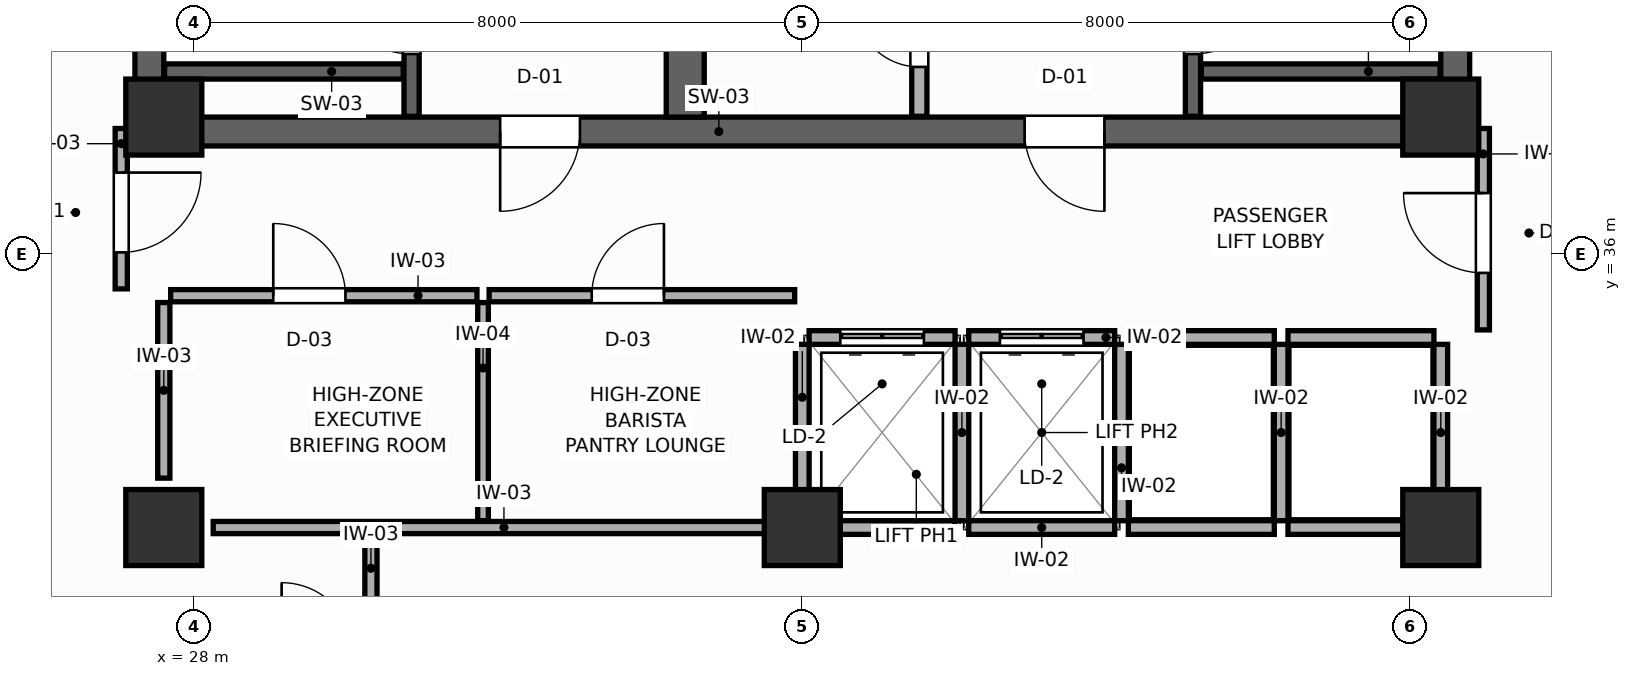
"""IFC4 building model, lengths in metres.
Left out: names, types, materials, properties, quantities, classifications, styles, units other than length and angle.
Written with IfcOpenShell. Run it as: python <this file> out.ifc"""

import sys

from ifc_helpers import new_model, si_unit, direction, frame, frame_2d, origin, origin_2d, place, context, subcontext, project, spatial, rectangle, extrude, source, transform, mapped, element, fill, save


model = new_model("IFC4")
c1 = context("Model", 3, precision=1e-05, world=origin(), true_north=direction((0.0, 1.0)))
c2 = subcontext(c1, "Body", "Model", "MODEL_VIEW")
j1 = project(units=[si_unit("LENGTHUNIT", "METRE"), si_unit("PLANEANGLEUNIT", "RADIAN")], contexts=[c1])
p1 = place(None, origin())
s1 = spatial("IfcSite", under=j1, at=p1, CompositionType="ELEMENT")
p2 = place(p1, origin())
s2 = spatial("IfcBuilding", under=s1, at=p2, CompositionType="ELEMENT")
p3 = place(p2, frame((0.0, 0.0, 238.2)))
s3 = spatial("IfcBuildingStorey", under=s2, at=p3, CompositionType="ELEMENT", Elevation=238.2)
p4 = place(p3, frame((27.22, 37.61, 0.0), z_axis=(0.0, 0.0, 1.0), x_axis=(1.0, 0.0, 0.0)))
e1 = element("IfcWall", 1, at=p4, inside=s3, PredefinedType="SHEAR", context=c2, shape_type="SweptSolid", body=[
    extrude(rectangle(XDim=17.56, YDim=0.38, at=frame_2d((8.78, 0.0))), origin(), (0.0, 0.0, 1.0), 4.8),
])
p5 = place(p4, frame((4.805, 0.0, 0.0)))
e2 = element("IfcOpeningElement", 2, at=p5, cuts=e1, PredefinedType="OPENING", context=c2, shape_type="SweptSolid", body=[
    extrude(rectangle(XDim=1.05, YDim=2.1, at=frame_2d((0.525, 1.05))), frame((0.0, 0.2, 0.0), z_axis=(0.0, -1.0, 0.0), x_axis=(1.0, 0.0, 0.0)), (0.0, 0.0, 1.0), 0.4),
])
p6 = place(p4, frame((11.705, 0.0, 0.0)))
e3 = element("IfcOpeningElement", 3, at=p6, cuts=e1, PredefinedType="OPENING", context=c2, shape_type="SweptSolid", body=[
    extrude(rectangle(XDim=1.05, YDim=2.1, at=frame_2d((0.525, 1.05))), frame((0.0, 0.2, 0.0), z_axis=(0.0, -1.0, 0.0), x_axis=(1.0, 0.0, 0.0)), (0.0, 0.0, 1.0), 0.4),
])
for number, where, z_axis, x_axis in (
    (4, (27.41, 37.8, 0.0), (0.0, 0.0, 1.0), (0.0, 1.0, 0.0)),
    (5, (44.59, 37.8, 0.0), (0.0, 0.0, 1.0), (0.0, 1.0, 0.0)),
):
    element("IfcWall", number, at=place(p3, frame(where, z_axis=z_axis, x_axis=x_axis)), inside=s3, PredefinedType="SHEAR", context=c2, shape_type="SweptSolid", body=[
        extrude(rectangle(XDim=9.0, YDim=0.38, at=frame_2d((4.5, 0.0))), origin(), (0.0, 0.0, 1.0), 4.8),
    ])
p7 = place(p3, frame((34.46, 37.8, 0.0), z_axis=(0.0, 0.0, 1.0), x_axis=(0.0, 1.0, 0.0)))
e6 = element("IfcWall", 6, at=p7, inside=s3, PredefinedType="SHEAR", context=c2, shape_type="SweptSolid", body=[
    extrude(rectangle(XDim=9.0, YDim=0.5, at=frame_2d((4.5, 0.0))), origin(), (0.0, 0.0, 1.0), 4.61),
])
m1 = source(origin(), c2, "Body", "SweptSolid", [
    extrude(rectangle(XDim=1.0, YDim=1.0, at=origin_2d()), origin(), (0.0, 0.0, 1.0), 4.8),
])
for number, where, z_axis, x_axis in (
    (7, (27.6, 37.8, 0.0), (0.0, 0.0, 1.0), (1.0, 0.0, 0.0)),
    (8, (44.4, 37.8, 0.0), (0.0, 0.0, 1.0), (1.0, 0.0, 0.0)),
    (9, (27.6, 32.4, 0.0), (0.0, 0.0, 1.0), (1.0, 0.0, 0.0)),
    (10, (44.4, 32.4, 0.0), (0.0, 0.0, 1.0), (1.0, 0.0, 0.0)),
    (11, (36.0, 32.4, 0.0), (0.0, 0.0, 1.0), (1.0, 0.0, 0.0)),
):
    element("IfcColumn", number, at=place(p3, frame(where, z_axis=z_axis, x_axis=x_axis)), inside=s3, PredefinedType="COLUMN", context=c2, shape_type="MappedRepresentation", body=[
        mapped(m1, transform((0.0, 0.0, 0.0), scale=1.0)),
    ])
p8 = place(p3, frame((30.86, 37.81, 0.0), z_axis=(0.0, 0.0, 1.0), x_axis=(0.0, 1.0, 0.0)))
e12 = element("IfcWall", 12, at=p8, inside=s3, PredefinedType="SHEAR", context=c2, shape_type="SweptSolid", body=[
    extrude(rectangle(XDim=8.98, YDim=0.2, at=frame_2d((4.49, 0.0))), origin(), (0.0, 0.0, 1.0), 4.8),
])
p9 = place(p8, frame((0.82, 0.0, 0.0)))
e13 = element("IfcOpeningElement", 13, at=p9, cuts=e12, PredefinedType="OPENING", context=c2, shape_type="SweptSolid", body=[
    extrude(rectangle(XDim=1.05, YDim=2.1, at=frame_2d((0.525, 1.05))), frame((0.0, 0.11, 0.0), z_axis=(0.0, -1.0, 0.0), x_axis=(1.0, 0.0, 0.0)), (0.0, 0.0, 1.0), 0.22),
])
p10 = place(p3, frame((27.61, 38.4, 0.0), z_axis=(0.0, 0.0, 1.0), x_axis=(1.0, 0.0, 0.0)))
e14 = element("IfcWall", 14, at=p10, inside=s3, PredefinedType="SHEAR", context=c2, shape_type="SweptSolid", body=[
    extrude(rectangle(XDim=3.14, YDim=0.2, at=frame_2d((1.57, 0.0))), origin(), (0.0, 0.0, 1.0), 4.8),
])
p11 = place(p3, frame((41.14, 37.81, 0.0), z_axis=(0.0, 0.0, 1.0), x_axis=(0.0, 1.0, 0.0)))
e15 = element("IfcWall", 15, at=p11, inside=s3, PredefinedType="SHEAR", context=c2, shape_type="SweptSolid", body=[
    extrude(rectangle(XDim=8.98, YDim=0.2, at=frame_2d((4.49, 0.0))), origin(), (0.0, 0.0, 1.0), 4.8),
])
p12 = place(p11, frame((0.82, 0.0, 0.0)))
e16 = element("IfcOpeningElement", 16, at=p12, cuts=e15, PredefinedType="OPENING", context=c2, shape_type="SweptSolid", body=[
    extrude(rectangle(XDim=1.05, YDim=2.1, at=frame_2d((0.525, 1.05))), frame((0.0, 0.11, 0.0), z_axis=(0.0, -1.0, 0.0), x_axis=(1.0, 0.0, 0.0)), (0.0, 0.0, 1.0), 0.22),
])
p13 = place(p3, frame((41.25, 38.4, 0.0), z_axis=(0.0, 0.0, 1.0), x_axis=(1.0, 0.0, 0.0)))
e17 = element("IfcWall", 17, at=p13, inside=s3, PredefinedType="SHEAR", context=c2, shape_type="SweptSolid", body=[
    extrude(rectangle(XDim=3.14, YDim=0.2, at=frame_2d((1.57, 0.0))), origin(), (0.0, 0.0, 1.0), 4.8),
])
p14 = place(p3, frame((37.54, 37.81, 0.0), z_axis=(0.0, 0.0, 1.0), x_axis=(0.0, 1.0, 0.0)))
e18 = element("IfcWall", 18, at=p14, inside=s3, PredefinedType="PARTITIONING", context=c2, shape_type="SweptSolid", body=[
    extrude(rectangle(XDim=8.98, YDim=0.2, at=frame_2d((4.49, 0.0))), origin(), (0.0, 0.0, 1.0), 4.61),
])
p15 = place(p14, frame((0.65, 0.0, 0.0)))
e19 = element("IfcOpeningElement", 19, at=p15, cuts=e18, PredefinedType="OPENING", context=c2, shape_type="SweptSolid", body=[
    extrude(rectangle(XDim=0.85, YDim=2.05, at=frame_2d((0.425, 1.025))), frame((0.0, 0.11, 0.0), z_axis=(0.0, -1.0, 0.0), x_axis=(1.0, 0.0, 0.0)), (0.0, 0.0, 1.0), 0.22),
])
p16 = place(p3, frame((36.09, 34.9, 0.0), z_axis=(0.0, 0.0, 1.0), x_axis=(1.0, 0.0, 0.0)))
e20 = element("IfcWall", 20, at=p16, inside=s3, PredefinedType="PARTITIONING", context=c2, shape_type="SweptSolid", body=[
    extrude(rectangle(XDim=1.92, YDim=0.18, at=frame_2d((0.96, 0.0))), origin(), (0.0, 0.0, 1.0), 4.61),
])
p17 = place(p16, frame((0.41, 0.0, 0.0)))
e21 = element("IfcOpeningElement", 21, at=p17, cuts=e20, PredefinedType="OPENING", context=c2, shape_type="SweptSolid", body=[
    extrude(rectangle(XDim=1.1, YDim=2.1, at=frame_2d((0.55, 1.05))), frame((0.0, 0.1, 0.0), z_axis=(0.0, -1.0, 0.0), x_axis=(1.0, 0.0, 0.0)), (0.0, 0.0, 1.0), 0.2),
])
p18 = place(p3, frame((36.09, 32.4, 0.0), z_axis=(0.0, 0.0, 1.0), x_axis=(1.0, 0.0, 0.0)))
e22 = element("IfcWall", 22, at=p18, inside=s3, PredefinedType="PARTITIONING", context=c2, shape_type="SweptSolid", body=[
    extrude(rectangle(XDim=1.92, YDim=0.18, at=frame_2d((0.96, 0.0))), origin(), (0.0, 0.0, 1.0), 2.57),
])
p19 = place(p3, frame((36.0, 32.49, 0.0), z_axis=(0.0, 0.0, 1.0), x_axis=(0.0, 1.0, 0.0)))
e23 = element("IfcWall", 23, at=p19, inside=s3, PredefinedType="PARTITIONING", context=c2, shape_type="SweptSolid", body=[
    extrude(rectangle(XDim=2.32, YDim=0.18, at=frame_2d((1.16, 0.0))), origin(), (0.0, 0.0, 1.0), 4.61),
])
p20 = place(p3, frame((38.19, 34.9, 0.0), z_axis=(0.0, 0.0, 1.0), x_axis=(1.0, 0.0, 0.0)))
e24 = element("IfcWall", 24, at=p20, inside=s3, PredefinedType="PARTITIONING", context=c2, shape_type="SweptSolid", body=[
    extrude(rectangle(XDim=1.92, YDim=0.18, at=frame_2d((0.96, 0.0))), origin(), (0.0, 0.0, 1.0), 4.61),
])
p21 = place(p20, frame((0.41, 0.0, 0.0)))
e25 = element("IfcOpeningElement", 25, at=p21, cuts=e24, PredefinedType="OPENING", context=c2, shape_type="SweptSolid", body=[
    extrude(rectangle(XDim=1.1, YDim=2.1, at=frame_2d((0.55, 1.05))), frame((0.0, 0.1, 0.0), z_axis=(0.0, -1.0, 0.0), x_axis=(1.0, 0.0, 0.0)), (0.0, 0.0, 1.0), 0.2),
])
p22 = place(p3, frame((38.19, 32.4, 0.0), z_axis=(0.0, 0.0, 1.0), x_axis=(1.0, 0.0, 0.0)))
e26 = element("IfcWall", 26, at=p22, inside=s3, PredefinedType="PARTITIONING", context=c2, shape_type="SweptSolid", body=[
    extrude(rectangle(XDim=1.92, YDim=0.18, at=frame_2d((0.96, 0.0))), origin(), (0.0, 0.0, 1.0), 2.57),
])
p23 = place(p3, frame((38.1, 32.49, 0.0), z_axis=(0.0, 0.0, 1.0), x_axis=(0.0, 1.0, 0.0)))
e27 = element("IfcWall", 27, at=p23, inside=s3, PredefinedType="PARTITIONING", context=c2, shape_type="SweptSolid", body=[
    extrude(rectangle(XDim=2.32, YDim=0.18, at=frame_2d((1.16, 0.0))), origin(), (0.0, 0.0, 1.0), 4.61),
])
p24 = place(p3, frame((40.29, 34.9, 0.0), z_axis=(0.0, 0.0, 1.0), x_axis=(1.0, 0.0, 0.0)))
e28 = element("IfcWall", 28, at=p24, inside=s3, PredefinedType="PARTITIONING", context=c2, shape_type="SweptSolid", body=[
    extrude(rectangle(XDim=1.92, YDim=0.18, at=frame_2d((0.96, 0.0))), origin(), (0.0, 0.0, 1.0), 4.61),
])
p25 = place(p3, frame((40.29, 32.4, 0.0), z_axis=(0.0, 0.0, 1.0), x_axis=(1.0, 0.0, 0.0)))
e29 = element("IfcWall", 29, at=p25, inside=s3, PredefinedType="PARTITIONING", context=c2, shape_type="SweptSolid", body=[
    extrude(rectangle(XDim=1.92, YDim=0.18, at=frame_2d((0.96, 0.0))), origin(), (0.0, 0.0, 1.0), 2.57),
])
p26 = place(p3, frame((40.2, 32.49, 0.0), z_axis=(0.0, 0.0, 1.0), x_axis=(0.0, 1.0, 0.0)))
e30 = element("IfcWall", 30, at=p26, inside=s3, PredefinedType="PARTITIONING", context=c2, shape_type="SweptSolid", body=[
    extrude(rectangle(XDim=2.32, YDim=0.18, at=frame_2d((1.16, 0.0))), origin(), (0.0, 0.0, 1.0), 4.61),
])
p27 = place(p3, frame((42.39, 34.9, 0.0), z_axis=(0.0, 0.0, 1.0), x_axis=(1.0, 0.0, 0.0)))
e31 = element("IfcWall", 31, at=p27, inside=s3, PredefinedType="PARTITIONING", context=c2, shape_type="SweptSolid", body=[
    extrude(rectangle(XDim=1.92, YDim=0.18, at=frame_2d((0.96, 0.0))), origin(), (0.0, 0.0, 1.0), 4.61),
])
p28 = place(p3, frame((42.39, 32.4, 0.0), z_axis=(0.0, 0.0, 1.0), x_axis=(1.0, 0.0, 0.0)))
e32 = element("IfcWall", 32, at=p28, inside=s3, PredefinedType="PARTITIONING", context=c2, shape_type="SweptSolid", body=[
    extrude(rectangle(XDim=1.92, YDim=0.18, at=frame_2d((0.96, 0.0))), origin(), (0.0, 0.0, 1.0), 2.57),
])
for number, where, z_axis, x_axis in (
    (33, (42.3, 32.49, 0.0), (0.0, 0.0, 1.0), (0.0, 1.0, 0.0)),
    (34, (44.4, 32.49, 0.0), (0.0, 0.0, 1.0), (0.0, 1.0, 0.0)),
):
    element("IfcWall", number, at=place(p3, frame(where, z_axis=z_axis, x_axis=x_axis)), inside=s3, PredefinedType="PARTITIONING", context=c2, shape_type="SweptSolid", body=[
        extrude(rectangle(XDim=2.32, YDim=0.18, at=frame_2d((1.16, 0.0))), origin(), (0.0, 0.0, 1.0), 4.61),
    ])
p29 = place(p3, frame((28.25, 32.4, 0.0), z_axis=(0.0, 0.0, 1.0), x_axis=(1.0, 0.0, 0.0)))
e35 = element("IfcWall", 35, at=p29, inside=s3, PredefinedType="PARTITIONING", context=c2, shape_type="SweptSolid", body=[
    extrude(rectangle(XDim=7.65, YDim=0.16, at=frame_2d((3.825, 0.0))), origin(), (0.0, 0.0, 1.0), 2.57),
])
p30 = place(p3, frame((27.6, 33.05, 0.0), z_axis=(0.0, 0.0, 1.0), x_axis=(0.0, 1.0, 0.0)))
e36 = element("IfcWall", 36, at=p30, inside=s3, PredefinedType="PARTITIONING", context=c2, shape_type="SweptSolid", body=[
    extrude(rectangle(XDim=2.31, YDim=0.16, at=frame_2d((1.155, 0.0))), origin(), (0.0, 0.0, 1.0), 4.61),
])
p31 = place(p3, frame((31.8, 32.49, 0.0), z_axis=(0.0, 0.0, 1.0), x_axis=(0.0, 1.0, 0.0)))
e37 = element("IfcWall", 37, at=p31, inside=s3, PredefinedType="PARTITIONING", context=c2, shape_type="SweptSolid", body=[
    extrude(rectangle(XDim=2.87, YDim=0.14, at=frame_2d((1.435, 0.0))), origin(), (0.0, 0.0, 1.0), 4.61),
])
p32 = place(p3, frame((27.69, 35.45, 0.0), z_axis=(0.0, 0.0, 1.0), x_axis=(1.0, 0.0, 0.0)))
e38 = element("IfcWall", 38, at=p32, inside=s3, PredefinedType="PARTITIONING", context=c2, shape_type="SweptSolid", body=[
    extrude(rectangle(XDim=4.03, YDim=0.16, at=frame_2d((2.015, 0.0))), origin(), (0.0, 0.0, 1.0), 4.61),
])
p33 = place(p32, frame((1.35, 0.0, 0.0)))
e39 = element("IfcOpeningElement", 39, at=p33, cuts=e38, PredefinedType="OPENING", context=c2, shape_type="SweptSolid", body=[
    extrude(rectangle(XDim=0.95, YDim=2.05, at=frame_2d((0.475, 1.025))), frame((0.0, 0.09, 0.0), z_axis=(0.0, -1.0, 0.0), x_axis=(1.0, 0.0, 0.0)), (0.0, 0.0, 1.0), 0.18),
])
p34 = place(p3, frame((31.88, 35.45, 0.0), z_axis=(0.0, 0.0, 1.0), x_axis=(1.0, 0.0, 0.0)))
e40 = element("IfcWall", 40, at=p34, inside=s3, PredefinedType="PARTITIONING", context=c2, shape_type="SweptSolid", body=[
    extrude(rectangle(XDim=4.02, YDim=0.16, at=frame_2d((2.01, 0.0))), origin(), (0.0, 0.0, 1.0), 4.61),
])
p35 = place(p34, frame((1.35, 0.0, 0.0)))
e41 = element("IfcOpeningElement", 41, at=p35, cuts=e40, PredefinedType="OPENING", context=c2, shape_type="SweptSolid", body=[
    extrude(rectangle(XDim=0.95, YDim=2.05, at=frame_2d((0.475, 1.025))), frame((0.0, 0.09, 0.0), z_axis=(0.0, -1.0, 0.0), x_axis=(1.0, 0.0, 0.0)), (0.0, 0.0, 1.0), 0.18),
])
p36 = place(p3, frame((27.04, 35.54, 0.0), z_axis=(0.0, 0.0, 1.0), x_axis=(0.0, 1.0, 0.0)))
e42 = element("IfcWall", 42, at=p36, inside=s3, PredefinedType="PARTITIONING", context=c2, shape_type="SweptSolid", body=[
    extrude(rectangle(XDim=2.11, YDim=0.16, at=frame_2d((1.055, 0.0))), origin(), (0.0, 0.0, 1.0), 4.61),
])
p37 = place(p36, frame((0.48, 0.0, 0.0)))
e43 = element("IfcOpeningElement", 43, at=p37, cuts=e42, PredefinedType="OPENING", context=c2, shape_type="SweptSolid", body=[
    extrude(rectangle(XDim=1.05, YDim=2.1, at=frame_2d((0.525, 1.05))), frame((0.0, 0.09, 0.0), z_axis=(0.0, -1.0, 0.0), x_axis=(1.0, 0.0, 0.0)), (0.0, 0.0, 1.0), 0.18),
])
p38 = place(p3, frame((44.96, 35.0, 0.0), z_axis=(0.0, 0.0, 1.0), x_axis=(0.0, 1.0, 0.0)))
e44 = element("IfcWall", 44, at=p38, inside=s3, PredefinedType="PARTITIONING", context=c2, shape_type="SweptSolid", body=[
    extrude(rectangle(XDim=2.65, YDim=0.16, at=frame_2d((1.325, 0.0))), origin(), (0.0, 0.0, 1.0), 4.61),
])
p39 = place(p38, frame((0.75, 0.0, 0.0)))
e45 = element("IfcOpeningElement", 45, at=p39, cuts=e44, PredefinedType="OPENING", context=c2, shape_type="SweptSolid", body=[
    extrude(rectangle(XDim=1.05, YDim=2.1, at=frame_2d((0.525, 1.05))), frame((0.0, 0.09, 0.0), z_axis=(0.0, -1.0, 0.0), x_axis=(1.0, 0.0, 0.0)), (0.0, 0.0, 1.0), 0.18),
])
p40 = place(p3, frame((30.325, 30.807, 0.0), z_axis=(0.0, 0.0, 1.0), x_axis=(0.0, 1.0, 0.0)))
e46 = element("IfcWall", 46, at=p40, inside=s3, PredefinedType="PARTITIONING", context=c2, shape_type="SweptSolid", body=[
    extrude(rectangle(XDim=1.511, YDim=0.16, at=frame_2d((0.756, 0.0))), origin(), (0.0, 0.0, 1.0), 4.61),
])
p41 = place(p9, origin())
e47 = element("IfcDoor", 47, at=p41, inside=s3, OperationType="SINGLE_SWING_RIGHT", PredefinedType="DOOR", context=c2, shape_type="SweptSolid", body=[
    extrude(rectangle(XDim=1.05, YDim=2.1, at=frame_2d((0.525, 1.05))), frame((0.0, 0.025, 0.0), z_axis=(0.0, -1.0, 0.0), x_axis=(1.0, 0.0, 0.0)), (0.0, 0.0, 1.0), 0.05),
])
fill(e13, e47)
p42 = place(p12, frame((1.05, 0.0, 0.0), z_axis=(0.0, 0.0, 1.0), x_axis=(-1.0, 0.0, 0.0)))
e48 = element("IfcDoor", 48, at=p42, inside=s3, OperationType="SINGLE_SWING_LEFT", PredefinedType="DOOR", context=c2, shape_type="SweptSolid", body=[
    extrude(rectangle(XDim=1.05, YDim=2.1, at=frame_2d((0.525, 1.05))), frame((0.0, 0.025, 0.0), z_axis=(0.0, -1.0, 0.0), x_axis=(1.0, 0.0, 0.0)), (0.0, 0.0, 1.0), 0.05),
])
fill(e16, e48)
p43 = place(p15, origin())
e49 = element("IfcDoor", 49, at=p43, inside=s3, OperationType="SINGLE_SWING_RIGHT", PredefinedType="DOOR", context=c2, shape_type="SweptSolid", body=[
    extrude(rectangle(XDim=0.85, YDim=2.05, at=frame_2d((0.425, 1.025))), frame((0.0, 0.025, 0.0), z_axis=(0.0, -1.0, 0.0), x_axis=(1.0, 0.0, 0.0)), (0.0, 0.0, 1.0), 0.05),
])
fill(e19, e49)
p44 = place(p17, origin())
e50 = element("IfcDoor", 50, at=p44, inside=s3, OperationType="DOUBLE_DOOR_SLIDING", PredefinedType="DOOR", context=c2, shape_type="SweptSolid", body=[
    extrude(rectangle(XDim=1.1, YDim=2.1, at=frame_2d((0.55, 1.05))), frame((0.0, 0.025, 0.0), z_axis=(0.0, -1.0, 0.0), x_axis=(1.0, 0.0, 0.0)), (0.0, 0.0, 1.0), 0.05),
])
fill(e21, e50)
p45 = place(p21, origin())
e51 = element("IfcDoor", 51, at=p45, inside=s3, OperationType="DOUBLE_DOOR_SLIDING", PredefinedType="DOOR", context=c2, shape_type="SweptSolid", body=[
    extrude(rectangle(XDim=1.1, YDim=2.1, at=frame_2d((0.55, 1.05))), frame((0.0, 0.025, 0.0), z_axis=(0.0, -1.0, 0.0), x_axis=(1.0, 0.0, 0.0)), (0.0, 0.0, 1.0), 0.05),
])
fill(e25, e51)
p46 = place(p33, origin())
e52 = element("IfcDoor", 52, at=p46, inside=s3, OperationType="SINGLE_SWING_LEFT", PredefinedType="DOOR", context=c2, shape_type="SweptSolid", body=[
    extrude(rectangle(XDim=0.95, YDim=2.05, at=frame_2d((0.475, 1.025))), frame((0.0, 0.025, 0.0), z_axis=(0.0, -1.0, 0.0), x_axis=(1.0, 0.0, 0.0)), (0.0, 0.0, 1.0), 0.05),
])
fill(e39, e52)
p47 = place(p35, origin())
e53 = element("IfcDoor", 53, at=p47, inside=s3, OperationType="SINGLE_SWING_RIGHT", PredefinedType="DOOR", context=c2, shape_type="SweptSolid", body=[
    extrude(rectangle(XDim=0.95, YDim=2.05, at=frame_2d((0.475, 1.025))), frame((0.0, 0.025, 0.0), z_axis=(0.0, -1.0, 0.0), x_axis=(1.0, 0.0, 0.0)), (0.0, 0.0, 1.0), 0.05),
])
fill(e41, e53)
p48 = place(p37, frame((1.05, 0.0, 0.0), z_axis=(0.0, 0.0, 1.0), x_axis=(-1.0, 0.0, 0.0)))
e54 = element("IfcDoor", 54, at=p48, inside=s3, OperationType="SINGLE_SWING_LEFT", PredefinedType="DOOR", context=c2, shape_type="SweptSolid", body=[
    extrude(rectangle(XDim=1.05, YDim=2.1, at=frame_2d((0.525, 1.05))), frame((0.0, 0.025, 0.0), z_axis=(0.0, -1.0, 0.0), x_axis=(1.0, 0.0, 0.0)), (0.0, 0.0, 1.0), 0.05),
])
fill(e43, e54)
p49 = place(p39, origin())
e55 = element("IfcDoor", 55, at=p49, inside=s3, OperationType="SINGLE_SWING_RIGHT", PredefinedType="DOOR", context=c2, shape_type="SweptSolid", body=[
    extrude(rectangle(XDim=1.05, YDim=2.1, at=frame_2d((0.525, 1.05))), frame((0.0, 0.025, 0.0), z_axis=(0.0, -1.0, 0.0), x_axis=(1.0, 0.0, 0.0)), (0.0, 0.0, 1.0), 0.05),
])
fill(e45, e55)
p50 = place(p5, frame((1.05, 0.0, 0.0), z_axis=(0.0, 0.0, 1.0), x_axis=(-1.0, 0.0, 0.0)))
e56 = element("IfcDoor", 56, at=p50, inside=s3, OperationType="SINGLE_SWING_RIGHT", PredefinedType="DOOR", context=c2, shape_type="SweptSolid", body=[
    extrude(rectangle(XDim=1.05, YDim=2.1, at=frame_2d((0.525, 1.05))), frame((0.0, 0.025, 0.0), z_axis=(0.0, -1.0, 0.0), x_axis=(1.0, 0.0, 0.0)), (0.0, 0.0, 1.0), 0.05),
])
fill(e2, e56)
p51 = place(p6, frame((1.05, 0.0, 0.0), z_axis=(0.0, 0.0, 1.0), x_axis=(-1.0, 0.0, 0.0)))
e57 = element("IfcDoor", 57, at=p51, inside=s3, OperationType="SINGLE_SWING_LEFT", PredefinedType="DOOR", context=c2, shape_type="SweptSolid", body=[
    extrude(rectangle(XDim=1.05, YDim=2.1, at=frame_2d((0.525, 1.05))), frame((0.0, 0.025, 0.0), z_axis=(0.0, -1.0, 0.0), x_axis=(1.0, 0.0, 0.0)), (0.0, 0.0, 1.0), 0.05),
])
fill(e3, e57)
save(model, sys.argv[1])
